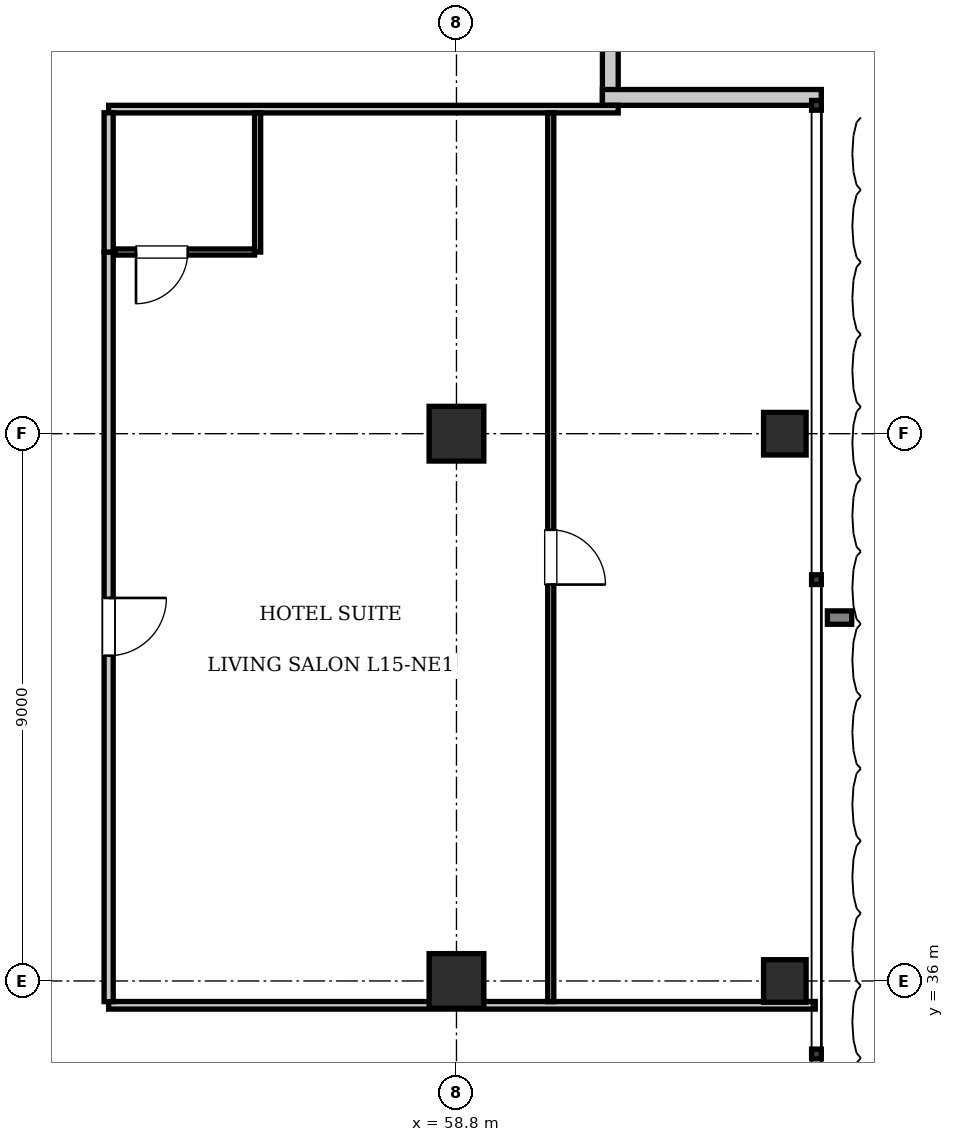
"""IFC4 building model, lengths in metres.
Left out: names, types, materials, properties, quantities, classifications, styles, units other than length and angle.
Written with IfcOpenShell. Run it as: python <this file> out.ifc"""

import sys

from ifc_helpers import new_model, si_unit, direction, frame, frame_2d, origin, origin_2d, place, context, subcontext, project, spatial, rectangle, i_section, extrude, element, fill, save


model = new_model("IFC4")
c1 = context("Model", 3, precision=1e-05, world=origin(), true_north=direction((0.0, 1.0)))
c2 = subcontext(c1, "Body", "Model", "MODEL_VIEW")
j1 = project(units=[si_unit("LENGTHUNIT", "METRE"), si_unit("PLANEANGLEUNIT", "RADIAN")], contexts=[c1])
p1 = place(None, origin())
s1 = spatial("IfcSite", under=j1, at=p1, CompositionType="ELEMENT")
p2 = place(p1, origin())
s2 = spatial("IfcBuilding", under=s1, at=p2, CompositionType="ELEMENT")
p3 = place(p2, frame((0.0, 0.0, 65.45)))
s3 = spatial("IfcBuildingStorey", under=s2, at=p3, CompositionType="ELEMENT", Elevation=65.45)
for number, where, z_axis, x_axis in (
    (1, (58.8, 36.0, 0.0), (0.0, 0.0, 1.0), (1.0, 0.0, 0.0)),
    (2, (58.8, 45.0, 0.0), (0.0, 0.0, 1.0), (1.0, 0.0, 0.0)),
):
    element("IfcColumn", number, at=place(p3, frame(where, z_axis=z_axis, x_axis=x_axis)), inside=s3, PredefinedType="COLUMN", context=c2, shape_type="SweptSolid", body=[
        extrude(rectangle(XDim=0.9, YDim=0.9, at=origin_2d()), origin(), (0.0, 0.0, 1.0), 3.85),
    ])
for number, where, z_axis, x_axis in (
    (3, (64.2, 36.0, 0.0), (0.0, 0.0, 1.0), (1.0, 0.0, 0.0)),
    (4, (64.2, 45.0, 0.0), (0.0, 0.0, 1.0), (1.0, 0.0, 0.0)),
):
    element("IfcColumn", number, at=place(p3, frame(where, z_axis=z_axis, x_axis=x_axis)), inside=s3, PredefinedType="COLUMN", context=c2, shape_type="SweptSolid", body=[
        extrude(i_section(OverallWidth=0.7, OverallDepth=0.7, WebThickness=0.028, FlangeThickness=0.044, at=origin_2d()), origin(), (0.0, 0.0, 1.0), 3.85),
    ])
for number, where, z_axis, x_axis in (
    (5, (61.33, 54.0, 0.0), (0.0, 0.0, 1.0), (0.0, -1.0, 0.0)),
    (6, (61.2, 50.53, 0.0), (0.0, 0.0, 1.0), (1.0, 0.0, 0.0)),
):
    element("IfcWall", number, at=place(p3, frame(where, z_axis=z_axis, x_axis=x_axis)), inside=s3, PredefinedType="SOLIDWALL", context=c2, shape_type="SweptSolid", body=[
        extrude(rectangle(XDim=3.6, YDim=0.26, at=frame_2d((1.8, 0.0))), origin(), (0.0, 0.0, 1.0), 3.61),
    ])
p4 = place(p3, frame((53.08, 35.6, 0.0), z_axis=(0.0, 0.0, 1.0), x_axis=(1.0, 0.0, 0.0)))
e7 = element("IfcWall", 7, at=p4, inside=s3, PredefinedType="PARTITIONING", context=c2, shape_type="SweptSolid", body=[
    extrude(rectangle(XDim=11.62, YDim=0.125, at=frame_2d((5.81, 0.0))), origin(), (0.0, 0.0, 1.0), 3.61),
])
p5 = place(p3, frame((53.08, 50.337, 0.0), z_axis=(0.0, 0.0, 1.0), x_axis=(1.0, 0.0, 0.0)))
e8 = element("IfcWall", 8, at=p5, inside=s3, PredefinedType="PARTITIONING", context=c2, shape_type="SweptSolid", body=[
    extrude(rectangle(XDim=8.38, YDim=0.125, at=frame_2d((4.19, 0.0))), origin(), (0.0, 0.0, 1.0), 3.61),
])
p6 = place(p3, frame((53.08, 35.66, 0.0), z_axis=(0.0, 0.0, 1.0), x_axis=(0.0, 1.0, 0.0)))
e9 = element("IfcWall", 9, at=p6, inside=s3, PredefinedType="PARTITIONING", context=c2, shape_type="SweptSolid", body=[
    extrude(rectangle(XDim=12.328, YDim=0.15, at=frame_2d((6.164, 0.0))), origin(), (0.0, 0.0, 1.0), 3.61),
])
p7 = place(p6, frame((5.689, 0.0, 0.0)))
e10 = element("IfcOpeningElement", 10, at=p7, cuts=e9, PredefinedType="OPENING", context=c2, shape_type="SweptSolid", body=[
    extrude(rectangle(XDim=0.95, YDim=2.15, at=frame_2d((0.475, 1.075))), frame((0.0, 0.085, 0.0), z_axis=(0.0, -1.0, 0.0), x_axis=(1.0, 0.0, 0.0)), (0.0, 0.0, 1.0), 0.17),
])
p8 = place(p3, frame((53.08, 47.988, 0.0), z_axis=(0.0, 0.0, 1.0), x_axis=(0.0, 1.0, 0.0)))
e11 = element("IfcWall", 11, at=p8, inside=s3, PredefinedType="PARTITIONING", context=c2, shape_type="SweptSolid", body=[
    extrude(rectangle(XDim=2.29, YDim=0.15, at=frame_2d((1.145, 0.0))), origin(), (0.0, 0.0, 1.0), 3.61),
])
p9 = place(p3, frame((55.53, 47.988, 0.0), z_axis=(0.0, 0.0, 1.0), x_axis=(0.0, 1.0, 0.0)))
e12 = element("IfcWall", 12, at=p9, inside=s3, PredefinedType="PARTITIONING", context=c2, shape_type="SweptSolid", body=[
    extrude(rectangle(XDim=2.29, YDim=0.1, at=frame_2d((1.145, 0.0))), origin(), (0.0, 0.0, 1.0), 3.61),
])
p10 = place(p3, frame((53.18, 47.988, 0.0), z_axis=(0.0, 0.0, 1.0), x_axis=(1.0, 0.0, 0.0)))
e13 = element("IfcWall", 13, at=p10, inside=s3, PredefinedType="PARTITIONING", context=c2, shape_type="SweptSolid", body=[
    extrude(rectangle(XDim=2.3, YDim=0.1, at=frame_2d((1.15, 0.0))), origin(), (0.0, 0.0, 1.0), 3.61),
])
p11 = place(p10, frame((0.35, 0.0, 0.0)))
e14 = element("IfcOpeningElement", 14, at=p11, cuts=e13, PredefinedType="OPENING", context=c2, shape_type="SweptSolid", body=[
    extrude(rectangle(XDim=0.85, YDim=2.1, at=frame_2d((0.425, 1.05))), frame((0.0, 0.06, 0.0), z_axis=(0.0, -1.0, 0.0), x_axis=(1.0, 0.0, 0.0)), (0.0, 0.0, 1.0), 0.12),
])
p12 = place(p3, frame((60.35, 35.66, 0.0), z_axis=(0.0, 0.0, 1.0), x_axis=(0.0, 1.0, 0.0)))
e15 = element("IfcWall", 15, at=p12, inside=s3, PredefinedType="PARTITIONING", context=c2, shape_type="SweptSolid", body=[
    extrude(rectangle(XDim=14.618, YDim=0.1, at=frame_2d((7.309, 0.0))), origin(), (0.0, 0.0, 1.0), 3.61),
])
p13 = place(p12, frame((6.859, 0.0, 0.0)))
e16 = element("IfcOpeningElement", 16, at=p13, cuts=e15, PredefinedType="OPENING", context=c2, shape_type="SweptSolid", body=[
    extrude(rectangle(XDim=0.9, YDim=2.1, at=frame_2d((0.45, 1.05))), frame((0.0, 0.06, 0.0), z_axis=(0.0, -1.0, 0.0), x_axis=(1.0, 0.0, 0.0)), (0.0, 0.0, 1.0), 0.12),
])
p14 = place(p11, frame((0.85, 0.0, 0.0), z_axis=(0.0, 0.0, 1.0), x_axis=(-1.0, 0.0, 0.0)))
e17 = element("IfcDoor", 17, at=p14, inside=s3, OperationType="SINGLE_SWING_RIGHT", PredefinedType="DOOR", context=c2, shape_type="SweptSolid", body=[
    extrude(rectangle(XDim=0.85, YDim=2.1, at=frame_2d((0.425, 1.05))), frame((0.0, 0.025, 0.0), z_axis=(0.0, -1.0, 0.0), x_axis=(1.0, 0.0, 0.0)), (0.0, 0.0, 1.0), 0.05),
])
fill(e14, e17)
p15 = place(p7, frame((0.95, 0.0, 0.0), z_axis=(0.0, 0.0, 1.0), x_axis=(-1.0, 0.0, 0.0)))
e18 = element("IfcDoor", 18, at=p15, inside=s3, OperationType="SINGLE_SWING_LEFT", PredefinedType="DOOR", context=c2, shape_type="SweptSolid", body=[
    extrude(rectangle(XDim=0.95, YDim=2.15, at=frame_2d((0.475, 1.075))), frame((0.0, 0.025, 0.0), z_axis=(0.0, -1.0, 0.0), x_axis=(1.0, 0.0, 0.0)), (0.0, 0.0, 1.0), 0.05),
])
fill(e10, e18)
p16 = place(p13, frame((0.9, 0.0, 0.0), z_axis=(0.0, 0.0, 1.0), x_axis=(-1.0, 0.0, 0.0)))
e19 = element("IfcDoor", 19, at=p16, inside=s3, OperationType="SINGLE_SWING_RIGHT", PredefinedType="DOOR", context=c2, shape_type="SweptSolid", body=[
    extrude(rectangle(XDim=0.9, YDim=2.1, at=frame_2d((0.45, 1.05))), frame((0.0, 0.025, 0.0), z_axis=(0.0, -1.0, 0.0), x_axis=(1.0, 0.0, 0.0)), (0.0, 0.0, 1.0), 0.05),
])
fill(e16, e19)
save(model, sys.argv[1])
